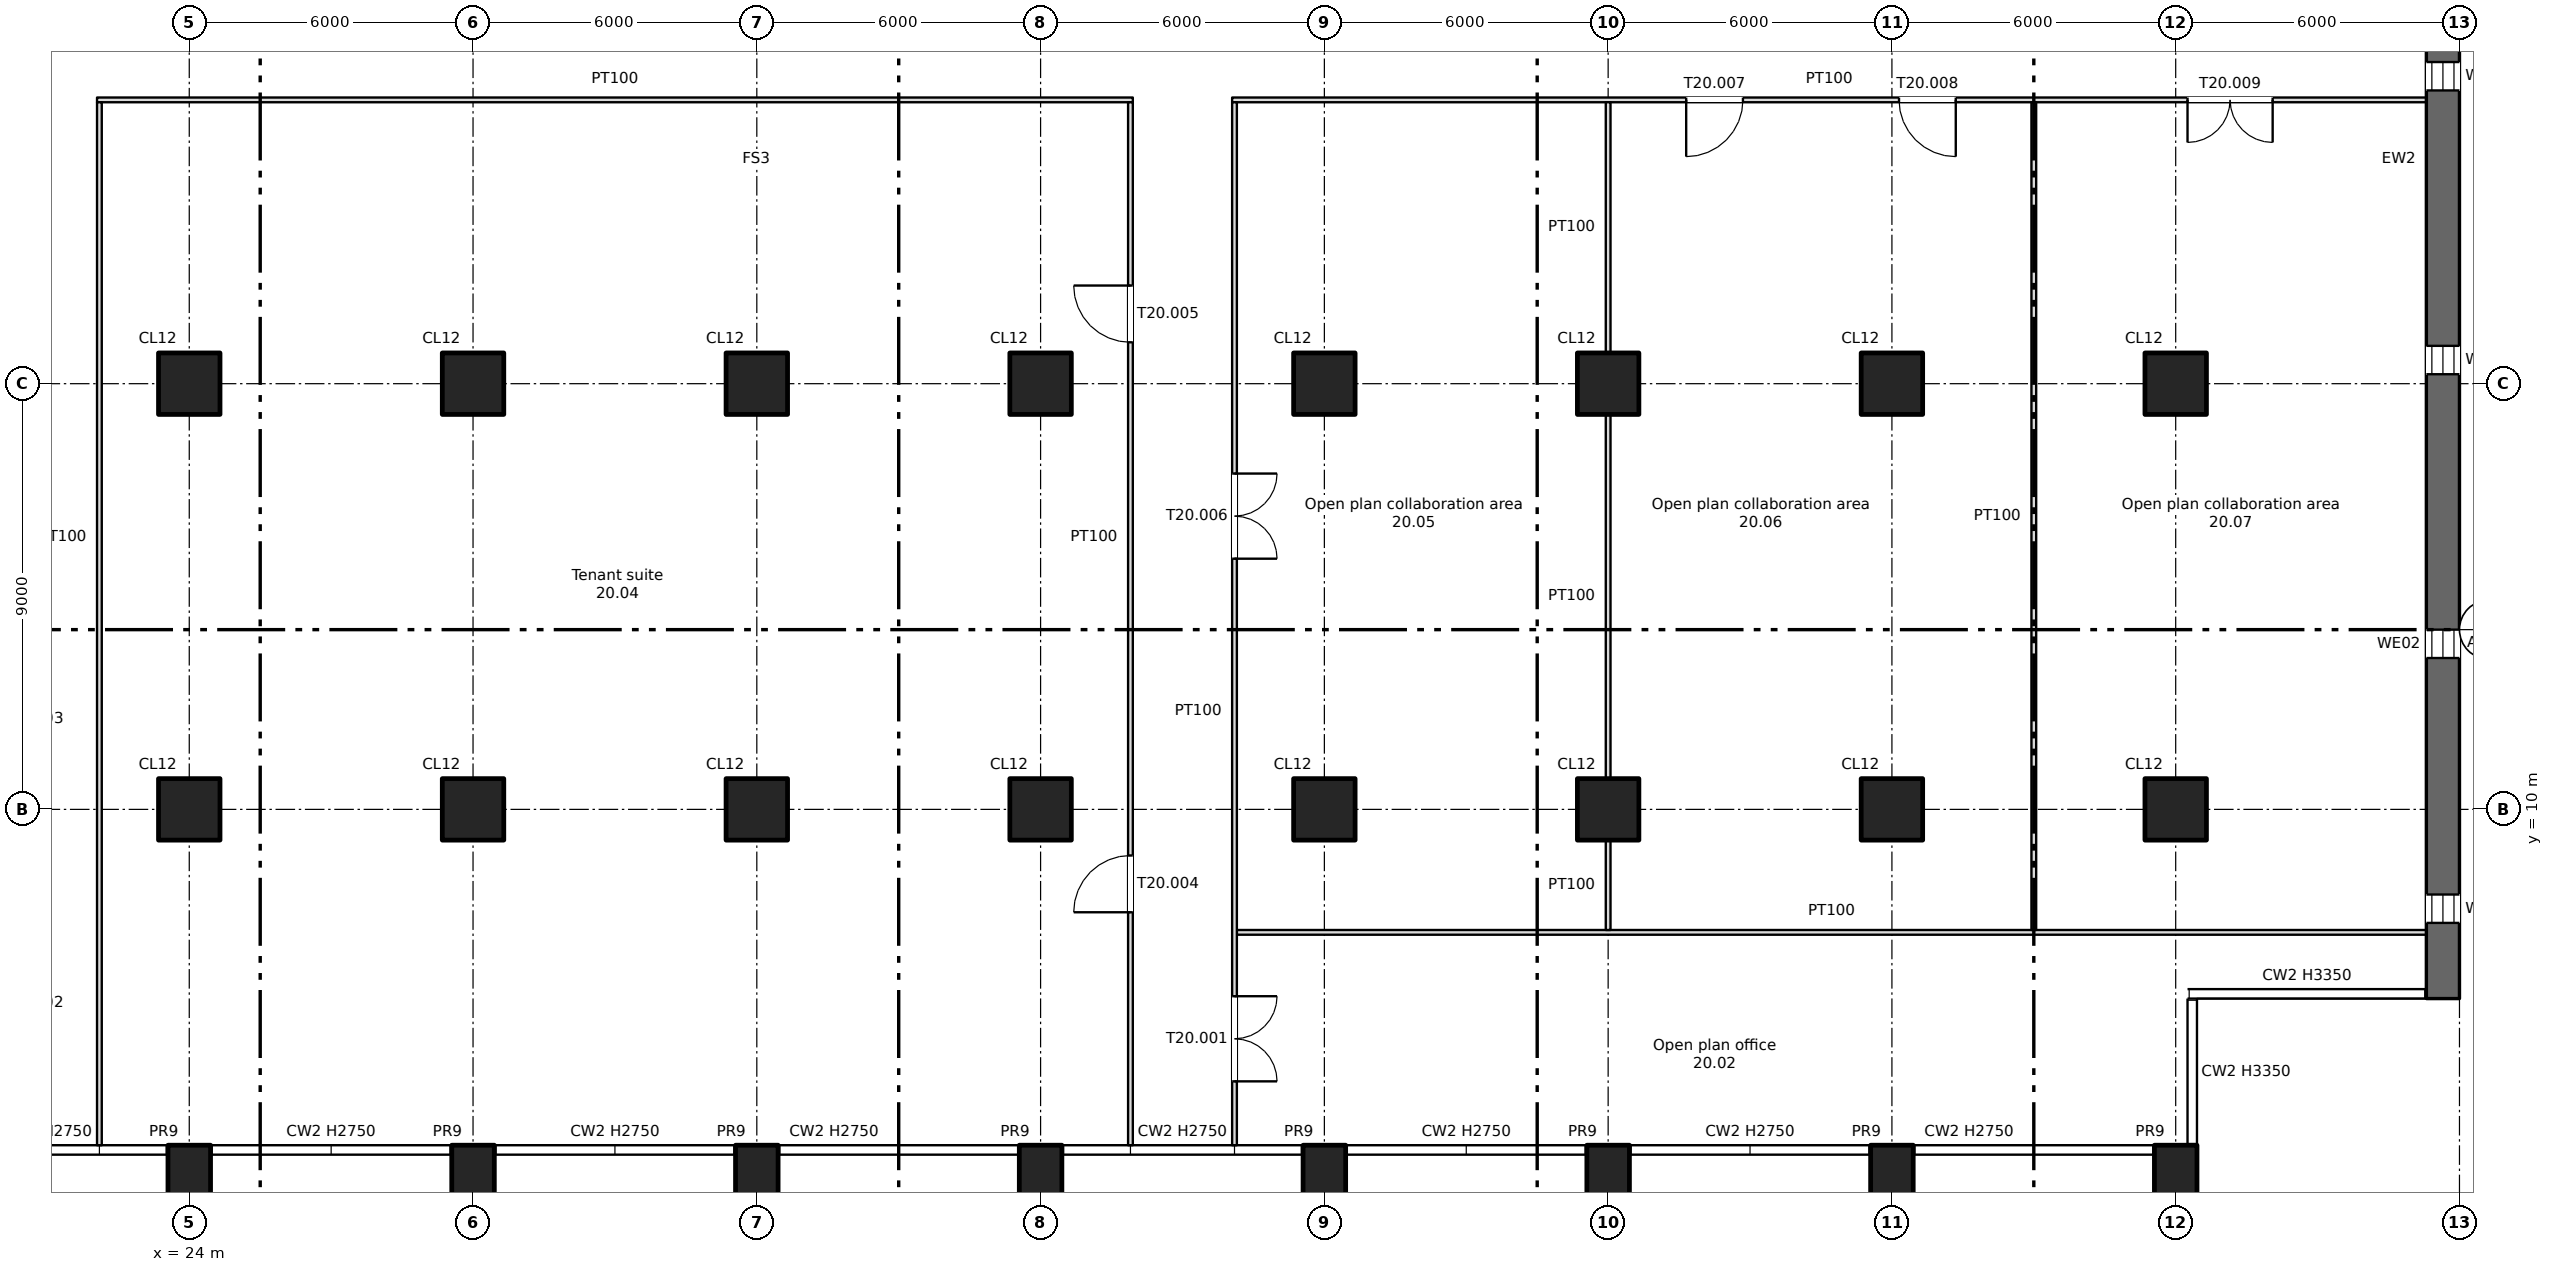
"""IFC4 building model, lengths in metres.
Left out: names, types, materials, properties, quantities, classifications, styles, units other than length and angle.
Written with IfcOpenShell. Run it as: python <this file> out.ifc"""

import sys

from ifc_helpers import new_model, si_unit, direction, frame, frame_2d, origin, origin_2d, place, context, subcontext, project, spatial, rectangle, extrude, element, fill, save


model = new_model("IFC4")
c1 = context("Model", 3, precision=1e-05, world=origin(), true_north=direction((0.0, 1.0)))
c2 = subcontext(c1, "Body", "Model", "MODEL_VIEW")
j1 = project(units=[si_unit("LENGTHUNIT", "METRE"), si_unit("PLANEANGLEUNIT", "RADIAN")], contexts=[c1])
p1 = place(None, origin())
s1 = spatial("IfcSite", under=j1, at=p1, CompositionType="ELEMENT")
p2 = place(p1, origin())
s2 = spatial("IfcBuilding", under=s1, at=p2, CompositionType="ELEMENT")
p3 = place(p2, frame((0.0, 0.0, 128.75)))
s3 = spatial("IfcBuildingStorey", under=s2, at=p3, CompositionType="ELEMENT", Elevation=128.75)
for number, where, z_axis, x_axis in (
    (1, (24.0, 2.2, -0.4), (0.0, 0.0, 1.0), (1.0, 0.0, 0.0)),
    (2, (30.0, 2.2, -0.4), (0.0, 0.0, 1.0), (1.0, 0.0, 0.0)),
    (3, (36.0, 2.2, -0.4), (0.0, 0.0, 1.0), (1.0, 0.0, 0.0)),
    (4, (42.0, 2.2, -0.4), (0.0, 0.0, 1.0), (1.0, 0.0, 0.0)),
    (5, (48.0, 2.2, -0.4), (0.0, 0.0, 1.0), (1.0, 0.0, 0.0)),
    (6, (54.0, 2.2, -0.4), (0.0, 0.0, 1.0), (1.0, 0.0, 0.0)),
    (7, (60.0, 2.2, -0.4), (0.0, 0.0, 1.0), (1.0, 0.0, 0.0)),
    (8, (66.0, 2.2, -0.4), (0.0, 0.0, 1.0), (1.0, 0.0, 0.0)),
):
    element("IfcColumn", number, at=place(p3, frame(where, z_axis=z_axis, x_axis=x_axis)), inside=s3, PredefinedType="COLUMN", context=c2, shape_type="SweptSolid", body=[
        extrude(rectangle(XDim=0.9, YDim=1.4, at=origin_2d()), origin(), (0.0, 0.0, 1.0), 3.75),
    ])
for number, where, z_axis, x_axis in (
    (9, (24.0, 10.0, 0.0), (0.0, 0.0, 1.0), (1.0, 0.0, 0.0)),
    (10, (24.0, 19.0, 0.0), (0.0, 0.0, 1.0), (1.0, 0.0, 0.0)),
    (11, (30.0, 10.0, 0.0), (0.0, 0.0, 1.0), (1.0, 0.0, 0.0)),
    (12, (30.0, 19.0, 0.0), (0.0, 0.0, 1.0), (1.0, 0.0, 0.0)),
    (13, (36.0, 10.0, 0.0), (0.0, 0.0, 1.0), (1.0, 0.0, 0.0)),
    (14, (36.0, 19.0, 0.0), (0.0, 0.0, 1.0), (1.0, 0.0, 0.0)),
    (15, (42.0, 10.0, 0.0), (0.0, 0.0, 1.0), (1.0, 0.0, 0.0)),
    (16, (42.0, 19.0, 0.0), (0.0, 0.0, 1.0), (1.0, 0.0, 0.0)),
    (17, (48.0, 10.0, 0.0), (0.0, 0.0, 1.0), (1.0, 0.0, 0.0)),
    (18, (48.0, 19.0, 0.0), (0.0, 0.0, 1.0), (1.0, 0.0, 0.0)),
    (19, (54.0, 10.0, 0.0), (0.0, 0.0, 1.0), (1.0, 0.0, 0.0)),
    (20, (54.0, 19.0, 0.0), (0.0, 0.0, 1.0), (1.0, 0.0, 0.0)),
    (21, (60.0, 10.0, 0.0), (0.0, 0.0, 1.0), (1.0, 0.0, 0.0)),
    (22, (60.0, 19.0, 0.0), (0.0, 0.0, 1.0), (1.0, 0.0, 0.0)),
    (23, (66.0, 10.0, 0.0), (0.0, 0.0, 1.0), (1.0, 0.0, 0.0)),
    (24, (66.0, 19.0, 0.0), (0.0, 0.0, 1.0), (1.0, 0.0, 0.0)),
):
    element("IfcColumn", number, at=place(p3, frame(where, z_axis=z_axis, x_axis=x_axis)), inside=s3, PredefinedType="COLUMN", context=c2, shape_type="SweptSolid", body=[
        extrude(rectangle(XDim=1.3, YDim=1.3, at=origin_2d()), origin(), (0.0, 0.0, 1.0), 3.35),
    ])
p4 = place(p3, frame((71.65, 6.0, 0.0), z_axis=(0.0, 0.0, 1.0), x_axis=(0.0, 1.0, 0.0)))
e25 = element("IfcWall", 25, at=p4, inside=s3, PredefinedType="SHEAR", context=c2, shape_type="SweptSolid", body=[
    extrude(rectangle(XDim=35.5, YDim=0.7, at=frame_2d((17.75, 0.0))), origin(), (0.0, 0.0, 1.0), 3.35),
])
p5 = place(p4, frame((1.6, 0.0, 0.6)))
e26 = element("IfcOpeningElement", 26, at=p5, cuts=e25, PredefinedType="OPENING", context=c2, shape_type="SweptSolid", body=[
    extrude(rectangle(XDim=0.6, YDim=2.4, at=frame_2d((0.3, 1.2))), frame((0.0, 0.36, 0.0), z_axis=(0.0, -1.0, 0.0), x_axis=(1.0, 0.0, 0.0)), (0.0, 0.0, 1.0), 0.72),
])
p6 = place(p4, frame((7.2, 0.0, 0.6)))
e27 = element("IfcOpeningElement", 27, at=p6, cuts=e25, PredefinedType="OPENING", context=c2, shape_type="SweptSolid", body=[
    extrude(rectangle(XDim=0.6, YDim=2.4, at=frame_2d((0.3, 1.2))), frame((0.0, 0.36, 0.0), z_axis=(0.0, -1.0, 0.0), x_axis=(1.0, 0.0, 0.0)), (0.0, 0.0, 1.0), 0.72),
])
p7 = place(p4, frame((13.2, 0.0, 0.6)))
e28 = element("IfcOpeningElement", 28, at=p7, cuts=e25, PredefinedType="OPENING", context=c2, shape_type="SweptSolid", body=[
    extrude(rectangle(XDim=0.6, YDim=2.4, at=frame_2d((0.3, 1.2))), frame((0.0, 0.36, 0.0), z_axis=(0.0, -1.0, 0.0), x_axis=(1.0, 0.0, 0.0)), (0.0, 0.0, 1.0), 0.72),
])
p8 = place(p4, frame((19.2, 0.0, 0.6)))
e29 = element("IfcOpeningElement", 29, at=p8, cuts=e25, PredefinedType="OPENING", context=c2, shape_type="SweptSolid", body=[
    extrude(rectangle(XDim=0.6, YDim=2.4, at=frame_2d((0.3, 1.2))), frame((0.0, 0.36, 0.0), z_axis=(0.0, -1.0, 0.0), x_axis=(1.0, 0.0, 0.0)), (0.0, 0.0, 1.0), 0.72),
])
p9 = place(p4, frame((25.2, 0.0, 0.6)))
e30 = element("IfcOpeningElement", 30, at=p9, cuts=e25, PredefinedType="OPENING", context=c2, shape_type="SweptSolid", body=[
    extrude(rectangle(XDim=0.6, YDim=2.4, at=frame_2d((0.3, 1.2))), frame((0.0, 0.36, 0.0), z_axis=(0.0, -1.0, 0.0), x_axis=(1.0, 0.0, 0.0)), (0.0, 0.0, 1.0), 0.72),
])
p10 = place(p4, frame((31.2, 0.0, 0.6)))
e31 = element("IfcOpeningElement", 31, at=p10, cuts=e25, PredefinedType="OPENING", context=c2, shape_type="SweptSolid", body=[
    extrude(rectangle(XDim=0.6, YDim=2.4, at=frame_2d((0.3, 1.2))), frame((0.0, 0.36, 0.0), z_axis=(0.0, -1.0, 0.0), x_axis=(1.0, 0.0, 0.0)), (0.0, 0.0, 1.0), 0.72),
])
p11 = place(p3, frame((46.15, 7.4, 0.0), z_axis=(0.0, 0.0, 1.0), x_axis=(1.0, 0.0, 0.0)))
e32 = element("IfcWall", 32, at=p11, inside=s3, PredefinedType="PARTITIONING", context=c2, shape_type="SweptSolid", body=[
    extrude(rectangle(XDim=25.15, YDim=0.1, at=frame_2d((12.575, 0.0))), origin(), (0.0, 0.0, 1.0), 3.35),
])
p12 = place(p3, frame((22.05, 25.0, 0.0), z_axis=(0.0, 0.0, 1.0), x_axis=(1.0, 0.0, 0.0)))
e33 = element("IfcWall", 33, at=p12, inside=s3, PredefinedType="PARTITIONING", context=c2, shape_type="SweptSolid", body=[
    extrude(rectangle(XDim=21.9, YDim=0.1, at=frame_2d((10.95, 0.0))), origin(), (0.0, 0.0, 1.0), 3.35),
])
p13 = place(p3, frame((46.05, 25.0, 0.0), z_axis=(0.0, 0.0, 1.0), x_axis=(1.0, 0.0, 0.0)))
e34 = element("IfcWall", 34, at=p13, inside=s3, PredefinedType="PARTITIONING", context=c2, shape_type="SweptSolid", body=[
    extrude(rectangle(XDim=25.25, YDim=0.1, at=frame_2d((12.625, 0.0))), origin(), (0.0, 0.0, 1.0), 3.35),
])
p14 = place(p13, frame((9.6, 0.0, 0.0)))
e35 = element("IfcOpeningElement", 35, at=p14, cuts=e34, PredefinedType="OPENING", context=c2, shape_type="SweptSolid", body=[
    extrude(rectangle(XDim=1.2, YDim=2.1, at=frame_2d((0.6, 1.05))), frame((0.0, 0.06, 0.0), z_axis=(0.0, -1.0, 0.0), x_axis=(1.0, 0.0, 0.0)), (0.0, 0.0, 1.0), 0.12),
])
p15 = place(p13, frame((14.1, 0.0, 0.0)))
e36 = element("IfcOpeningElement", 36, at=p15, cuts=e34, PredefinedType="OPENING", context=c2, shape_type="SweptSolid", body=[
    extrude(rectangle(XDim=1.2, YDim=2.1, at=frame_2d((0.6, 1.05))), frame((0.0, 0.06, 0.0), z_axis=(0.0, -1.0, 0.0), x_axis=(1.0, 0.0, 0.0)), (0.0, 0.0, 1.0), 0.12),
])
p16 = place(p13, frame((20.2, 0.0, 0.0)))
e37 = element("IfcOpeningElement", 37, at=p16, cuts=e34, PredefinedType="OPENING", context=c2, shape_type="SweptSolid", body=[
    extrude(rectangle(XDim=1.8, YDim=2.1, at=frame_2d((0.9, 1.05))), frame((0.0, 0.06, 0.0), z_axis=(0.0, -1.0, 0.0), x_axis=(1.0, 0.0, 0.0)), (0.0, 0.0, 1.0), 0.12),
])
p17 = place(p3, frame((22.1, 2.9, 0.0), z_axis=(0.0, 0.0, 1.0), x_axis=(0.0, 1.0, 0.0)))
e38 = element("IfcWall", 38, at=p17, inside=s3, PredefinedType="PARTITIONING", context=c2, shape_type="SweptSolid", body=[
    extrude(rectangle(XDim=22.05, YDim=0.1, at=frame_2d((11.025, 0.0))), origin(), (0.0, 0.0, 1.0), 3.35),
])
p18 = place(p3, frame((43.9, 2.9, 0.0), z_axis=(0.0, 0.0, 1.0), x_axis=(0.0, 1.0, 0.0)))
e39 = element("IfcWall", 39, at=p18, inside=s3, PredefinedType="PARTITIONING", context=c2, shape_type="SweptSolid", body=[
    extrude(rectangle(XDim=22.05, YDim=0.1, at=frame_2d((11.025, 0.0))), origin(), (0.0, 0.0, 1.0), 3.35),
])
p19 = place(p18, frame((4.925, 0.0, 0.0)))
e40 = element("IfcOpeningElement", 40, at=p19, cuts=e39, PredefinedType="OPENING", context=c2, shape_type="SweptSolid", body=[
    extrude(rectangle(XDim=1.2, YDim=2.1, at=frame_2d((0.6, 1.05))), frame((0.0, 0.06, 0.0), z_axis=(0.0, -1.0, 0.0), x_axis=(1.0, 0.0, 0.0)), (0.0, 0.0, 1.0), 0.12),
])
p20 = place(p18, frame((16.975, 0.0, 0.0)))
e41 = element("IfcOpeningElement", 41, at=p20, cuts=e39, PredefinedType="OPENING", context=c2, shape_type="SweptSolid", body=[
    extrude(rectangle(XDim=1.2, YDim=2.1, at=frame_2d((0.6, 1.05))), frame((0.0, 0.06, 0.0), z_axis=(0.0, -1.0, 0.0), x_axis=(1.0, 0.0, 0.0)), (0.0, 0.0, 1.0), 0.12),
])
p21 = place(p3, frame((46.1, 2.9, 0.0), z_axis=(0.0, 0.0, 1.0), x_axis=(0.0, 1.0, 0.0)))
e42 = element("IfcWall", 42, at=p21, inside=s3, PredefinedType="PARTITIONING", context=c2, shape_type="SweptSolid", body=[
    extrude(rectangle(XDim=22.05, YDim=0.1, at=frame_2d((11.025, 0.0))), origin(), (0.0, 0.0, 1.0), 3.35),
])
p22 = place(p21, frame((1.35, 0.0, 0.0)))
e43 = element("IfcOpeningElement", 43, at=p22, cuts=e42, PredefinedType="OPENING", context=c2, shape_type="SweptSolid", body=[
    extrude(rectangle(XDim=1.8, YDim=2.1, at=frame_2d((0.9, 1.05))), frame((0.0, 0.06, 0.0), z_axis=(0.0, -1.0, 0.0), x_axis=(1.0, 0.0, 0.0)), (0.0, 0.0, 1.0), 0.12),
])
p23 = place(p21, frame((12.4, 0.0, 0.0)))
e44 = element("IfcOpeningElement", 44, at=p23, cuts=e42, PredefinedType="OPENING", context=c2, shape_type="SweptSolid", body=[
    extrude(rectangle(XDim=1.8, YDim=2.1, at=frame_2d((0.9, 1.05))), frame((0.0, 0.06, 0.0), z_axis=(0.0, -1.0, 0.0), x_axis=(1.0, 0.0, 0.0)), (0.0, 0.0, 1.0), 0.12),
])
p24 = place(p3, frame((54.0, 7.45, 0.0), z_axis=(0.0, 0.0, 1.0), x_axis=(0.0, 1.0, 0.0)))
e45 = element("IfcWall", 45, at=p24, inside=s3, PredefinedType="PARTITIONING", context=c2, shape_type="SweptSolid", body=[
    extrude(rectangle(XDim=1.9, YDim=0.1, at=frame_2d((0.95, 0.0))), origin(), (0.0, 0.0, 1.0), 3.35),
])
p25 = place(p3, frame((54.0, 10.65, 0.0), z_axis=(0.0, 0.0, 1.0), x_axis=(0.0, 1.0, 0.0)))
e46 = element("IfcWall", 46, at=p25, inside=s3, PredefinedType="PARTITIONING", context=c2, shape_type="SweptSolid", body=[
    extrude(rectangle(XDim=7.7, YDim=0.1, at=frame_2d((3.85, 0.0))), origin(), (0.0, 0.0, 1.0), 3.35),
])
p26 = place(p3, frame((54.0, 19.65, 0.0), z_axis=(0.0, 0.0, 1.0), x_axis=(0.0, 1.0, 0.0)))
e47 = element("IfcWall", 47, at=p26, inside=s3, PredefinedType="PARTITIONING", context=c2, shape_type="SweptSolid", body=[
    extrude(rectangle(XDim=5.3, YDim=0.1, at=frame_2d((2.65, 0.0))), origin(), (0.0, 0.0, 1.0), 3.35),
])
p27 = place(p3, frame((63.0, 7.45, 0.0), z_axis=(0.0, 0.0, 1.0), x_axis=(0.0, 1.0, 0.0)))
e48 = element("IfcWall", 48, at=p27, inside=s3, PredefinedType="PARTITIONING", context=c2, shape_type="SweptSolid", body=[
    extrude(rectangle(XDim=17.5, YDim=0.1, at=frame_2d((8.75, 0.0))), origin(), (0.0, 0.0, 1.0), 3.35),
])
p28 = place(p5, origin())
e49 = element("IfcWindow", 49, at=p28, inside=s3, PartitioningType="SINGLE_PANEL", PredefinedType="WINDOW", context=c2, shape_type="SweptSolid", body=[
    extrude(rectangle(XDim=0.6, YDim=2.4, at=frame_2d((0.3, 1.2))), frame((0.0, 0.03, 0.0), z_axis=(0.0, -1.0, 0.0), x_axis=(1.0, 0.0, 0.0)), (0.0, 0.0, 1.0), 0.06),
])
fill(e26, e49)
p29 = place(p6, origin())
e50 = element("IfcWindow", 50, at=p29, inside=s3, PartitioningType="SINGLE_PANEL", PredefinedType="WINDOW", context=c2, shape_type="SweptSolid", body=[
    extrude(rectangle(XDim=0.6, YDim=2.4, at=frame_2d((0.3, 1.2))), frame((0.0, 0.03, 0.0), z_axis=(0.0, -1.0, 0.0), x_axis=(1.0, 0.0, 0.0)), (0.0, 0.0, 1.0), 0.06),
])
fill(e27, e50)
p30 = place(p7, origin())
e51 = element("IfcWindow", 51, at=p30, inside=s3, PartitioningType="SINGLE_PANEL", PredefinedType="WINDOW", context=c2, shape_type="SweptSolid", body=[
    extrude(rectangle(XDim=0.6, YDim=2.4, at=frame_2d((0.3, 1.2))), frame((0.0, 0.03, 0.0), z_axis=(0.0, -1.0, 0.0), x_axis=(1.0, 0.0, 0.0)), (0.0, 0.0, 1.0), 0.06),
])
fill(e28, e51)
p31 = place(p8, origin())
e52 = element("IfcWindow", 52, at=p31, inside=s3, PartitioningType="SINGLE_PANEL", PredefinedType="WINDOW", context=c2, shape_type="SweptSolid", body=[
    extrude(rectangle(XDim=0.6, YDim=2.4, at=frame_2d((0.3, 1.2))), frame((0.0, 0.03, 0.0), z_axis=(0.0, -1.0, 0.0), x_axis=(1.0, 0.0, 0.0)), (0.0, 0.0, 1.0), 0.06),
])
fill(e29, e52)
p32 = place(p22, origin())
e53 = element("IfcDoor", 53, at=p32, inside=s3, OperationType="DOUBLE_DOOR_SINGLE_SWING", PredefinedType="DOOR", context=c2, shape_type="SweptSolid", body=[
    extrude(rectangle(XDim=1.8, YDim=2.1, at=frame_2d((0.9, 1.05))), frame((0.0, 0.025, 0.0), z_axis=(0.0, -1.0, 0.0), x_axis=(1.0, 0.0, 0.0)), (0.0, 0.0, 1.0), 0.05),
])
fill(e43, e53)
p33 = place(p19, origin())
e54 = element("IfcDoor", 54, at=p33, inside=s3, OperationType="SINGLE_SWING_LEFT", PredefinedType="DOOR", context=c2, shape_type="SweptSolid", body=[
    extrude(rectangle(XDim=1.2, YDim=2.1, at=frame_2d((0.6, 1.05))), frame((0.0, 0.025, 0.0), z_axis=(0.0, -1.0, 0.0), x_axis=(1.0, 0.0, 0.0)), (0.0, 0.0, 1.0), 0.05),
])
fill(e40, e54)
p34 = place(p20, origin())
e55 = element("IfcDoor", 55, at=p34, inside=s3, OperationType="SINGLE_SWING_RIGHT", PredefinedType="DOOR", context=c2, shape_type="SweptSolid", body=[
    extrude(rectangle(XDim=1.2, YDim=2.1, at=frame_2d((0.6, 1.05))), frame((0.0, 0.025, 0.0), z_axis=(0.0, -1.0, 0.0), x_axis=(1.0, 0.0, 0.0)), (0.0, 0.0, 1.0), 0.05),
])
fill(e41, e55)
p35 = place(p23, origin())
e56 = element("IfcDoor", 56, at=p35, inside=s3, OperationType="DOUBLE_DOOR_SINGLE_SWING", PredefinedType="DOOR", context=c2, shape_type="SweptSolid", body=[
    extrude(rectangle(XDim=1.8, YDim=2.1, at=frame_2d((0.9, 1.05))), frame((0.0, 0.025, 0.0), z_axis=(0.0, -1.0, 0.0), x_axis=(1.0, 0.0, 0.0)), (0.0, 0.0, 1.0), 0.05),
])
fill(e44, e56)
p36 = place(p14, origin())
e57 = element("IfcDoor", 57, at=p36, inside=s3, OperationType="SINGLE_SWING_LEFT", PredefinedType="DOOR", context=c2, shape_type="SweptSolid", body=[
    extrude(rectangle(XDim=1.2, YDim=2.1, at=frame_2d((0.6, 1.05))), frame((0.0, 0.025, 0.0), z_axis=(0.0, -1.0, 0.0), x_axis=(1.0, 0.0, 0.0)), (0.0, 0.0, 1.0), 0.05),
])
fill(e35, e57)
p37 = place(p15, origin())
e58 = element("IfcDoor", 58, at=p37, inside=s3, OperationType="SINGLE_SWING_RIGHT", PredefinedType="DOOR", context=c2, shape_type="SweptSolid", body=[
    extrude(rectangle(XDim=1.2, YDim=2.1, at=frame_2d((0.6, 1.05))), frame((0.0, 0.025, 0.0), z_axis=(0.0, -1.0, 0.0), x_axis=(1.0, 0.0, 0.0)), (0.0, 0.0, 1.0), 0.05),
])
fill(e36, e58)
p38 = place(p16, origin())
e59 = element("IfcDoor", 59, at=p38, inside=s3, OperationType="DOUBLE_DOOR_SINGLE_SWING", PredefinedType="DOOR", context=c2, shape_type="SweptSolid", body=[
    extrude(rectangle(XDim=1.8, YDim=2.1, at=frame_2d((0.9, 1.05))), frame((0.0, 0.025, 0.0), z_axis=(0.0, -1.0, 0.0), x_axis=(1.0, 0.0, 0.0)), (0.0, 0.0, 1.0), 0.05),
])
fill(e37, e59)
save(model, sys.argv[1])
